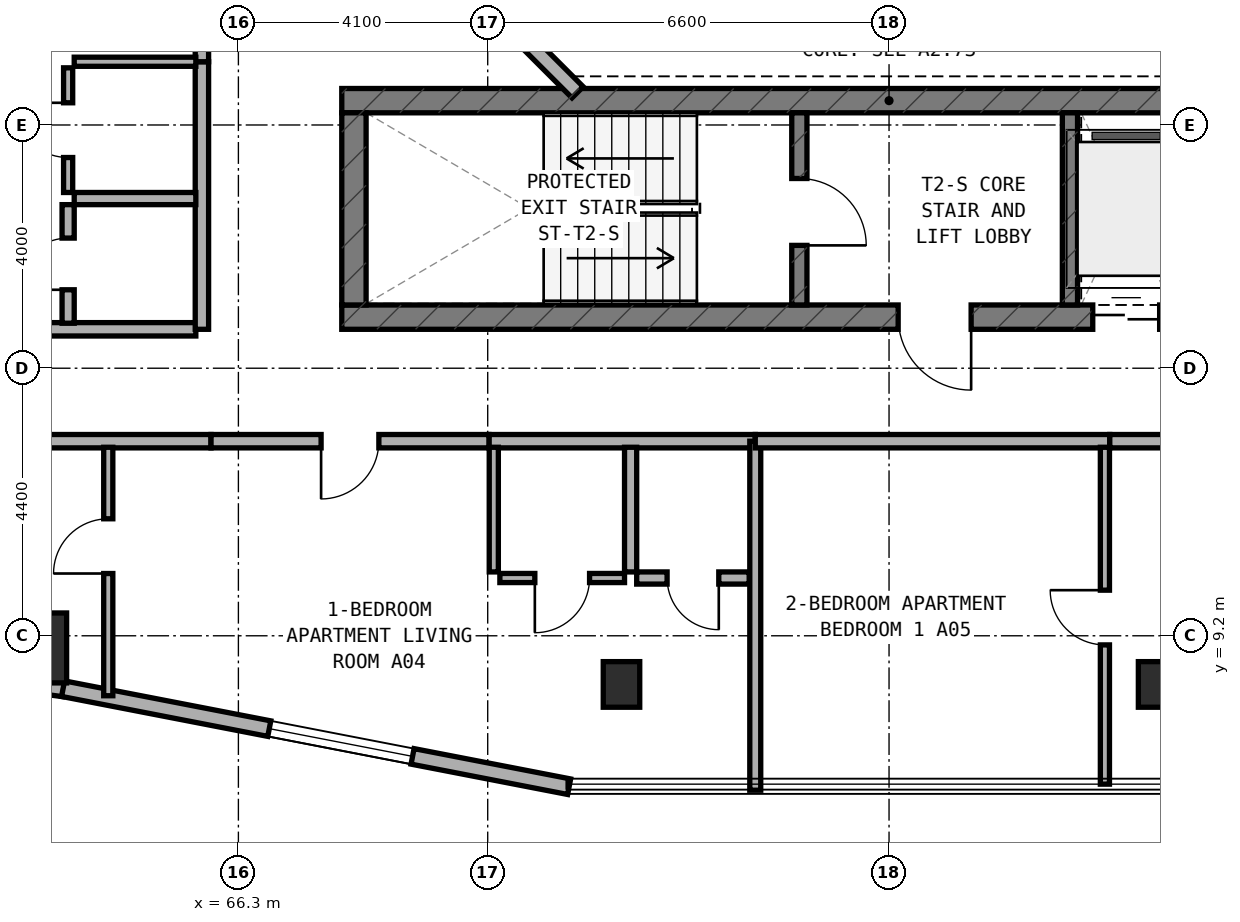
"""IFC4 building model, lengths in metres.
Left out: names, types, materials, properties, quantities, classifications, styles, units other than length and angle.
Written with IfcOpenShell. Run it as: python <this file> out.ifc"""

import sys

from ifc_helpers import new_model, si_unit, direction, frame, frame_2d, origin, origin_2d, place, context, subcontext, project, spatial, rectangle, extrude, element, fill, save


model = new_model("IFC4")
c1 = context("Model", 3, precision=1e-05, world=origin(), true_north=direction((0.0, 1.0)))
c2 = subcontext(c1, "Body", "Model", "MODEL_VIEW")
j1 = project(units=[si_unit("LENGTHUNIT", "METRE"), si_unit("PLANEANGLEUNIT", "RADIAN")], contexts=[c1])
p1 = place(None, origin())
s1 = spatial("IfcSite", under=j1, at=p1, CompositionType="ELEMENT")
p2 = place(p1, origin())
s2 = spatial("IfcBuilding", under=s1, at=p2, CompositionType="ELEMENT")
p3 = place(p2, frame((0.0, 0.0, 98.5)))
s3 = spatial("IfcBuildingStorey", under=s2, at=p3, CompositionType="ELEMENT", Elevation=98.5)
p4 = place(p3, frame((68.0, 14.44, 0.0), z_axis=(0.0, 0.0, 1.0), x_axis=(1.0, 0.0, 0.0)))
e1 = element("IfcWall", 1, at=p4, inside=s3, PredefinedType="SHEAR", context=c2, shape_type="SweptSolid", body=[
    extrude(rectangle(XDim=18.2, YDim=0.4, at=frame_2d((9.1, 0.0))), origin(), (0.0, 0.0, 1.0), 3.5),
])
p5 = place(p4, frame((9.15, 0.0, 0.0)))
e2 = element("IfcOpeningElement", 2, at=p5, cuts=e1, PredefinedType="OPENING", context=c2, shape_type="SweptSolid", body=[
    extrude(rectangle(XDim=1.2, YDim=2.15, at=frame_2d((0.6, 1.075))), frame((0.0, 0.21, 0.0), z_axis=(0.0, -1.0, 0.0), x_axis=(1.0, 0.0, 0.0)), (0.0, 0.0, 1.0), 0.42),
])
p6 = place(p4, frame((16.75, 0.0, 0.0)))
e3 = element("IfcOpeningElement", 3, at=p6, cuts=e1, PredefinedType="OPENING", context=c2, shape_type="SweptSolid", body=[
    extrude(rectangle(XDim=0.85, YDim=2.1, at=frame_2d((0.425, 1.05))), frame((0.0, 0.21, 0.0), z_axis=(0.0, -1.0, 0.0), x_axis=(1.0, 0.0, 0.0)), (0.0, 0.0, 1.0), 0.42),
])
p7 = place(p4, frame((12.35, 0.0, 0.0)))
e4 = element("IfcOpeningElement", 4, at=p7, cuts=e1, PredefinedType="OPENING", context=c2, shape_type="SweptSolid", body=[
    extrude(rectangle(XDim=1.1, YDim=2.15, at=frame_2d((0.55, 1.075))), frame((0.0, 0.21, 0.0), z_axis=(0.0, -1.0, 0.0), x_axis=(1.0, 0.0, 0.0)), (0.0, 0.0, 1.0), 0.42),
])
p8 = place(p4, frame((13.95, 0.0, 0.0)))
e5 = element("IfcOpeningElement", 5, at=p8, cuts=e1, PredefinedType="OPENING", context=c2, shape_type="SweptSolid", body=[
    extrude(rectangle(XDim=1.1, YDim=2.15, at=frame_2d((0.55, 1.075))), frame((0.0, 0.21, 0.0), z_axis=(0.0, -1.0, 0.0), x_axis=(1.0, 0.0, 0.0)), (0.0, 0.0, 1.0), 0.42),
])
p9 = place(p3, frame((68.0, 18.0, 0.0), z_axis=(0.0, 0.0, 1.0), x_axis=(1.0, 0.0, 0.0)))
e6 = element("IfcWall", 6, at=p9, inside=s3, PredefinedType="SHEAR", context=c2, shape_type="SweptSolid", body=[
    extrude(rectangle(XDim=18.2, YDim=0.4, at=frame_2d((9.1, 0.0))), origin(), (0.0, 0.0, 1.0), 3.5),
])
p10 = place(p3, frame((68.2, 14.64, 0.0), z_axis=(0.0, 0.0, 1.0), x_axis=(0.0, 1.0, 0.0)))
e7 = element("IfcWall", 7, at=p10, inside=s3, PredefinedType="SHEAR", context=c2, shape_type="SweptSolid", body=[
    extrude(rectangle(XDim=3.16, YDim=0.4, at=frame_2d((1.58, 0.0))), origin(), (0.0, 0.0, 1.0), 3.5),
])
p11 = place(p3, frame((75.525, 14.64, 0.0), z_axis=(0.0, 0.0, 1.0), x_axis=(0.0, 1.0, 0.0)))
e8 = element("IfcWall", 8, at=p11, inside=s3, PredefinedType="STANDARD", context=c2, shape_type="SweptSolid", body=[
    extrude(rectangle(XDim=3.16, YDim=0.25, at=frame_2d((1.58, 0.0))), origin(), (0.0, 0.0, 1.0), 3.25),
])
p12 = place(p11, frame((0.98, 0.0, 0.0)))
e9 = element("IfcOpeningElement", 9, at=p12, cuts=e8, PredefinedType="OPENING", context=c2, shape_type="SweptSolid", body=[
    extrude(rectangle(XDim=1.1, YDim=2.15, at=frame_2d((0.55, 1.075))), frame((0.0, 0.135, 0.0), z_axis=(0.0, -1.0, 0.0), x_axis=(1.0, 0.0, 0.0)), (0.0, 0.0, 1.0), 0.27),
])
p13 = place(p3, frame((79.975, 14.64, 0.0), z_axis=(0.0, 0.0, 1.0), x_axis=(0.0, 1.0, 0.0)))
e10 = element("IfcWall", 10, at=p13, inside=s3, PredefinedType="STANDARD", context=c2, shape_type="SweptSolid", body=[
    extrude(rectangle(XDim=3.16, YDim=0.25, at=frame_2d((1.58, 0.0))), origin(), (0.0, 0.0, 1.0), 3.25),
])
for number, where, z_axis, x_axis in (
    (11, (72.6, 8.4, 0.0), (0.0, 0.0, 1.0), (1.0, 0.0, 0.0)),
    (12, (81.4, 8.4, 0.0), (0.0, 0.0, 1.0), (1.0, 0.0, 0.0)),
):
    element("IfcColumn", number, at=place(p3, frame(where, z_axis=z_axis, x_axis=x_axis)), inside=s3, PredefinedType="COLUMN", context=c2, shape_type="SweptSolid", body=[
        extrude(rectangle(XDim=0.6, YDim=0.75, at=origin_2d()), origin(), (0.0, 0.0, 1.0), 3.5),
    ])
p14 = place(p3, frame((63.0, 9.0, 0.0), z_axis=(0.0, 0.0, 1.0), x_axis=(1.0, 0.0, 0.0)))
e13 = element("IfcColumn", 13, at=p14, inside=s3, PredefinedType="COLUMN", context=c2, shape_type="SweptSolid", body=[
    extrude(rectangle(XDim=0.95, YDim=1.15, at=origin_2d()), origin(), (0.0, 0.0, 1.0), 3.5),
])
p15 = place(p3, frame((62.719, 8.421, 0.0), z_axis=(0.0, 0.0, 1.0), x_axis=(0.991433279471, -0.130614135366, 0.0)))
e14 = element("IfcWall", 14, at=p15, inside=s3, PredefinedType="STANDARD", context=c2, shape_type="SweptSolid", body=[
    extrude(rectangle(XDim=0.712, YDim=0.26, at=frame_2d((0.356, 0.0))), origin(), (0.0, 0.0, 1.0), 3.25),
])
p16 = place(p3, frame((63.417, 8.33, 0.0), z_axis=(0.0, 0.0, 1.0), x_axis=(0.981750199588, -0.190175039396, 0.0)))
e15 = element("IfcWall", 15, at=p16, inside=s3, PredefinedType="STANDARD", context=c2, shape_type="SweptSolid", body=[
    extrude(rectangle(XDim=8.477, YDim=0.26, at=frame_2d((4.238, 0.0))), origin(), (0.0, 0.0, 1.0), 3.25),
])
p17 = place(p16, frame((3.454, 0.0, 0.8)))
e16 = element("IfcOpeningElement", 16, at=p17, cuts=e15, PredefinedType="OPENING", context=c2, shape_type="SweptSolid", body=[
    extrude(rectangle(XDim=2.4, YDim=1.6, at=frame_2d((1.2, 0.8))), frame((0.0, 0.14, 0.0), z_axis=(0.0, -1.0, 0.0), x_axis=(1.0, 0.0, 0.0)), (0.0, 0.0, 1.0), 0.28),
])
p18 = place(p3, frame((70.244, 19.772, 0.0), z_axis=(0.0, 0.0, 1.0), x_axis=(0.707106781187, -0.707106781187, 0.0)))
e17 = element("IfcWall", 17, at=p18, inside=s3, PredefinedType="STANDARD", context=c2, shape_type="SweptSolid", body=[
    extrude(rectangle(XDim=2.311, YDim=0.26, at=frame_2d((1.155, 0.0))), origin(), (0.0, 0.0, 1.0), 3.25),
])
p19 = place(p3, frame((59.36, 12.4, 0.0), z_axis=(0.0, 0.0, 1.0), x_axis=(1.0, 0.0, 0.0)))
e18 = element("IfcWall", 18, at=p19, inside=s3, PredefinedType="SOLIDWALL", context=c2, shape_type="SweptSolid", body=[
    extrude(rectangle(XDim=6.49, YDim=0.22, at=frame_2d((3.245, 0.0))), origin(), (0.0, 0.0, 1.0), 2.945),
])
p20 = place(p3, frame((70.42, 12.4, 0.0), z_axis=(0.0, 0.0, 1.0), x_axis=(1.0, 0.0, 0.0)))
e19 = element("IfcWall", 19, at=p20, inside=s3, PredefinedType="SOLIDWALL", context=c2, shape_type="SweptSolid", body=[
    extrude(rectangle(XDim=4.38, YDim=0.22, at=frame_2d((2.19, 0.0))), origin(), (0.0, 0.0, 1.0), 2.825),
])
p21 = place(p3, frame((65.85, 12.4, 0.0), z_axis=(0.0, 0.0, 1.0), x_axis=(1.0, 0.0, 0.0)))
e20 = element("IfcWall", 20, at=p21, inside=s3, PredefinedType="SOLIDWALL", context=c2, shape_type="SweptSolid", body=[
    extrude(rectangle(XDim=4.57, YDim=0.22, at=frame_2d((2.285, 0.0))), origin(), (0.0, 0.0, 1.0), 3.22),
])
p22 = place(p21, frame((1.81, 0.0, 0.0)))
e21 = element("IfcOpeningElement", 21, at=p22, cuts=e20, PredefinedType="OPENING", context=c2, shape_type="SweptSolid", body=[
    extrude(rectangle(XDim=0.95, YDim=2.1, at=frame_2d((0.475, 1.05))), frame((0.0, 0.12, 0.0), z_axis=(0.0, -1.0, 0.0), x_axis=(1.0, 0.0, 0.0)), (0.0, 0.0, 1.0), 0.24),
])
p23 = place(p3, frame((64.16, 8.214, 0.0), z_axis=(0.0, 0.0, 1.0), x_axis=(0.0, 1.0, 0.0)))
e22 = element("IfcWall", 22, at=p23, inside=s3, PredefinedType="PARTITIONING", context=c2, shape_type="SweptSolid", body=[
    extrude(rectangle(XDim=4.086, YDim=0.15, at=frame_2d((2.043, 0.0))), origin(), (0.0, 0.0, 1.0), 2.945),
])
p24 = place(p23, frame((2.01, 0.0, 0.0)))
e23 = element("IfcOpeningElement", 23, at=p24, cuts=e22, PredefinedType="OPENING", context=c2, shape_type="SweptSolid", body=[
    extrude(rectangle(XDim=0.9, YDim=2.1, at=frame_2d((0.45, 1.05))), frame((0.0, 0.085, 0.0), z_axis=(0.0, -1.0, 0.0), x_axis=(1.0, 0.0, 0.0)), (0.0, 0.0, 1.0), 0.17),
])
p25 = place(p3, frame((72.75, 10.25, 0.0), z_axis=(0.0, 0.0, 1.0), x_axis=(0.0, 1.0, 0.0)))
e24 = element("IfcWall", 24, at=p25, inside=s3, PredefinedType="PLUMBINGWALL", context=c2, shape_type="SweptSolid", body=[
    extrude(rectangle(XDim=2.05, YDim=0.2, at=frame_2d((1.025, 0.0))), origin(), (0.0, 0.0, 1.0), 2.825),
])
p26 = place(p3, frame((70.5, 10.25, 0.0), z_axis=(0.0, 0.0, 1.0), x_axis=(0.0, 1.0, 0.0)))
e25 = element("IfcWall", 25, at=p26, inside=s3, PredefinedType="PARTITIONING", context=c2, shape_type="SweptSolid", body=[
    extrude(rectangle(XDim=2.05, YDim=0.15, at=frame_2d((1.025, 0.0))), origin(), (0.0, 0.0, 1.0), 3.22),
])
p27 = place(p3, frame((72.85, 10.15, 0.0), z_axis=(0.0, 0.0, 1.0), x_axis=(1.0, 0.0, 0.0)))
e26 = element("IfcWall", 26, at=p27, inside=s3, PredefinedType="PLUMBINGWALL", context=c2, shape_type="SweptSolid", body=[
    extrude(rectangle(XDim=1.85, YDim=0.2, at=frame_2d((0.925, 0.0))), origin(), (0.0, 0.0, 1.0), 3.22),
])
p28 = place(p27, frame((0.5, 0.0, 0.0)))
e27 = element("IfcOpeningElement", 27, at=p28, cuts=e26, PredefinedType="OPENING", context=c2, shape_type="SweptSolid", body=[
    extrude(rectangle(XDim=0.85, YDim=2.1, at=frame_2d((0.425, 1.05))), frame((0.0, 0.11, 0.0), z_axis=(0.0, -1.0, 0.0), x_axis=(1.0, 0.0, 0.0)), (0.0, 0.0, 1.0), 0.22),
])
p29 = place(p3, frame((70.6, 10.15, 0.0), z_axis=(0.0, 0.0, 1.0), x_axis=(1.0, 0.0, 0.0)))
e28 = element("IfcWall", 28, at=p29, inside=s3, PredefinedType="PARTITIONING", context=c2, shape_type="SweptSolid", body=[
    extrude(rectangle(XDim=2.05, YDim=0.15, at=frame_2d((1.025, 0.0))), origin(), (0.0, 0.0, 1.0), 2.825),
])
p30 = place(p29, frame((0.575, 0.0, 0.0)))
e29 = element("IfcOpeningElement", 29, at=p30, cuts=e28, PredefinedType="OPENING", context=c2, shape_type="SweptSolid", body=[
    extrude(rectangle(XDim=0.9, YDim=2.1, at=frame_2d((0.45, 1.05))), frame((0.0, 0.085, 0.0), z_axis=(0.0, -1.0, 0.0), x_axis=(1.0, 0.0, 0.0)), (0.0, 0.0, 1.0), 0.17),
])
p31 = place(p3, frame((74.8, 6.66, 0.0), z_axis=(0.0, 0.0, 1.0), x_axis=(0.0, 1.0, 0.0)))
e30 = element("IfcWall", 30, at=p31, inside=s3, PredefinedType="SOLIDWALL", context=c2, shape_type="SweptSolid", body=[
    extrude(rectangle(XDim=5.74, YDim=0.18, at=frame_2d((2.87, 0.0))), origin(), (0.0, 0.0, 1.0), 2.945),
])
p32 = place(p3, frame((74.8, 12.4, 0.0), z_axis=(0.0, 0.0, 1.0), x_axis=(1.0, 0.0, 0.0)))
e31 = element("IfcWall", 31, at=p32, inside=s3, PredefinedType="SOLIDWALL", context=c2, shape_type="SweptSolid", body=[
    extrude(rectangle(XDim=5.83, YDim=0.22, at=frame_2d((2.915, 0.0))), origin(), (0.0, 0.0, 1.0), 3.22),
])
p33 = place(p3, frame((80.63, 12.4, 0.0), z_axis=(0.0, 0.0, 1.0), x_axis=(1.0, 0.0, 0.0)))
e32 = element("IfcWall", 32, at=p33, inside=s3, PredefinedType="SOLIDWALL", context=c2, shape_type="SweptSolid", body=[
    extrude(rectangle(XDim=3.88, YDim=0.22, at=frame_2d((1.94, 0.0))), origin(), (0.0, 0.0, 1.0), 2.825),
])
p34 = place(p33, frame((1.465, 0.0, 0.0)))
e33 = element("IfcOpeningElement", 33, at=p34, cuts=e32, PredefinedType="OPENING", context=c2, shape_type="SweptSolid", body=[
    extrude(rectangle(XDim=0.95, YDim=2.1, at=frame_2d((0.475, 1.05))), frame((0.0, 0.12, 0.0), z_axis=(0.0, -1.0, 0.0), x_axis=(1.0, 0.0, 0.0)), (0.0, 0.0, 1.0), 0.24),
])
p35 = place(p3, frame((80.55, 6.76, 0.0), z_axis=(0.0, 0.0, 1.0), x_axis=(0.0, 1.0, 0.0)))
e34 = element("IfcWall", 34, at=p35, inside=s3, PredefinedType="PARTITIONING", context=c2, shape_type="SweptSolid", body=[
    extrude(rectangle(XDim=5.54, YDim=0.15, at=frame_2d((2.77, 0.0))), origin(), (0.0, 0.0, 1.0), 2.945),
])
p36 = place(p35, frame((2.29, 0.0, 0.0)))
e35 = element("IfcOpeningElement", 35, at=p36, cuts=e34, PredefinedType="OPENING", context=c2, shape_type="SweptSolid", body=[
    extrude(rectangle(XDim=0.9, YDim=2.1, at=frame_2d((0.45, 1.05))), frame((0.0, 0.085, 0.0), z_axis=(0.0, -1.0, 0.0), x_axis=(1.0, 0.0, 0.0)), (0.0, 0.0, 1.0), 0.17),
])
p37 = place(p3, frame((59.52, 14.24, 0.0), z_axis=(0.0, 0.0, 1.0), x_axis=(1.0, 0.0, 0.0)))
e36 = element("IfcWall", 36, at=p37, inside=s3, PredefinedType="SOLIDWALL", context=c2, shape_type="SweptSolid", body=[
    extrude(rectangle(XDim=6.08, YDim=0.22, at=frame_2d((3.04, 0.0))), origin(), (0.0, 0.0, 1.0), 2.945),
])
p38 = place(p3, frame((65.7, 14.24, 0.0), z_axis=(0.0, 0.0, 1.0), x_axis=(0.0, 1.0, 0.0)))
e37 = element("IfcWall", 37, at=p38, inside=s3, PredefinedType="SOLIDWALL", context=c2, shape_type="SweptSolid", body=[
    extrude(rectangle(XDim=4.4, YDim=0.22, at=frame_2d((2.2, 0.0))), origin(), (0.0, 0.0, 1.0), 3.22),
])
p39 = place(p3, frame((65.7, 18.64, 0.0), z_axis=(0.0, 0.0, 1.0), x_axis=(0.0, 1.0, 0.0)))
e38 = element("IfcWall", 38, at=p39, inside=s3, PredefinedType="SOLIDWALL", context=c2, shape_type="SweptSolid", body=[
    extrude(rectangle(XDim=9.36, YDim=0.22, at=frame_2d((4.68, 0.0))), origin(), (0.0, 0.0, 1.0), 2.825),
])
p40 = place(p39, frame((2.305, 0.0, 0.0)))
e39 = element("IfcOpeningElement", 39, at=p40, cuts=e38, PredefinedType="OPENING", context=c2, shape_type="SweptSolid", body=[
    extrude(rectangle(XDim=0.95, YDim=2.1, at=frame_2d((0.475, 1.05))), frame((0.0, 0.12, 0.0), z_axis=(0.0, -1.0, 0.0), x_axis=(1.0, 0.0, 0.0)), (0.0, 0.0, 1.0), 0.24),
])
p41 = place(p3, frame((63.6, 16.39, 0.0), z_axis=(0.0, 0.0, 1.0), x_axis=(1.0, 0.0, 0.0)))
e40 = element("IfcWall", 40, at=p41, inside=s3, PredefinedType="PLUMBINGWALL", context=c2, shape_type="SweptSolid", body=[
    extrude(rectangle(XDim=2.0, YDim=0.2, at=frame_2d((1.0, 0.0))), origin(), (0.0, 0.0, 1.0), 3.22),
])
p42 = place(p3, frame((63.6, 18.64, 0.0), z_axis=(0.0, 0.0, 1.0), x_axis=(1.0, 0.0, 0.0)))
e41 = element("IfcWall", 41, at=p42, inside=s3, PredefinedType="PARTITIONING", context=c2, shape_type="SweptSolid", body=[
    extrude(rectangle(XDim=2.0, YDim=0.15, at=frame_2d((1.0, 0.0))), origin(), (0.0, 0.0, 1.0), 3.22),
])
p43 = place(p3, frame((63.5, 14.34, 0.0), z_axis=(0.0, 0.0, 1.0), x_axis=(0.0, 1.0, 0.0)))
e42 = element("IfcWall", 42, at=p43, inside=s3, PredefinedType="PLUMBINGWALL", context=c2, shape_type="SweptSolid", body=[
    extrude(rectangle(XDim=1.95, YDim=0.2, at=frame_2d((0.975, 0.0))), origin(), (0.0, 0.0, 1.0), 3.22),
])
p44 = place(p43, frame((0.55, 0.0, 0.0)))
e43 = element("IfcOpeningElement", 43, at=p44, cuts=e42, PredefinedType="OPENING", context=c2, shape_type="SweptSolid", body=[
    extrude(rectangle(XDim=0.85, YDim=2.1, at=frame_2d((0.425, 1.05))), frame((0.0, 0.11, 0.0), z_axis=(0.0, -1.0, 0.0), x_axis=(1.0, 0.0, 0.0)), (0.0, 0.0, 1.0), 0.22),
])
p45 = place(p3, frame((63.5, 16.49, 0.0), z_axis=(0.0, 0.0, 1.0), x_axis=(0.0, 1.0, 0.0)))
e44 = element("IfcWall", 44, at=p45, inside=s3, PredefinedType="PARTITIONING", context=c2, shape_type="SweptSolid", body=[
    extrude(rectangle(XDim=2.05, YDim=0.15, at=frame_2d((1.025, 0.0))), origin(), (0.0, 0.0, 1.0), 3.22),
])
p46 = place(p45, frame((0.575, 0.0, 0.0)))
e45 = element("IfcOpeningElement", 45, at=p46, cuts=e44, PredefinedType="OPENING", context=c2, shape_type="SweptSolid", body=[
    extrude(rectangle(XDim=0.9, YDim=2.1, at=frame_2d((0.45, 1.05))), frame((0.0, 0.085, 0.0), z_axis=(0.0, -1.0, 0.0), x_axis=(1.0, 0.0, 0.0)), (0.0, 0.0, 1.0), 0.17),
])
p47 = place(p17, origin())
e46 = element("IfcWindow", 46, at=p47, inside=s3, PartitioningType="SINGLE_PANEL", PredefinedType="WINDOW", context=c2, shape_type="SweptSolid", body=[
    extrude(rectangle(XDim=2.4, YDim=1.6, at=frame_2d((1.2, 0.8))), frame((0.0, 0.03, 0.0), z_axis=(0.0, -1.0, 0.0), x_axis=(1.0, 0.0, 0.0)), (0.0, 0.0, 1.0), 0.06),
])
fill(e16, e46)
p48 = place(p12, frame((1.1, 0.0, 0.0), z_axis=(0.0, 0.0, 1.0), x_axis=(-1.0, 0.0, 0.0)))
e47 = element("IfcDoor", 47, at=p48, inside=s3, OperationType="SINGLE_SWING_RIGHT", PredefinedType="DOOR", context=c2, shape_type="SweptSolid", body=[
    extrude(rectangle(XDim=1.1, YDim=2.15, at=frame_2d((0.55, 1.075))), frame((0.0, 0.025, 0.0), z_axis=(0.0, -1.0, 0.0), x_axis=(1.0, 0.0, 0.0)), (0.0, 0.0, 1.0), 0.05),
])
fill(e9, e47)
p49 = place(p5, frame((1.2, 0.0, 0.0), z_axis=(0.0, 0.0, 1.0), x_axis=(-1.0, 0.0, 0.0)))
e48 = element("IfcDoor", 48, at=p49, inside=s3, OperationType="SINGLE_SWING_LEFT", PredefinedType="DOOR", context=c2, shape_type="SweptSolid", body=[
    extrude(rectangle(XDim=1.2, YDim=2.15, at=frame_2d((0.6, 1.075))), frame((0.0, 0.025, 0.0), z_axis=(0.0, -1.0, 0.0), x_axis=(1.0, 0.0, 0.0)), (0.0, 0.0, 1.0), 0.05),
])
fill(e2, e48)
p50 = place(p7, frame((1.1, 0.0, 0.0), z_axis=(0.0, 0.0, 1.0), x_axis=(-1.0, 0.0, 0.0)))
e49 = element("IfcDoor", 49, at=p50, inside=s3, OperationType="DOUBLE_DOOR_SLIDING", PredefinedType="DOOR", context=c2, shape_type="SweptSolid", body=[
    extrude(rectangle(XDim=1.1, YDim=2.15, at=frame_2d((0.55, 1.075))), frame((0.0, 0.025, 0.0), z_axis=(0.0, -1.0, 0.0), x_axis=(1.0, 0.0, 0.0)), (0.0, 0.0, 1.0), 0.05),
])
fill(e4, e49)
p51 = place(p22, frame((0.95, 0.0, 0.0), z_axis=(0.0, 0.0, 1.0), x_axis=(-1.0, 0.0, 0.0)))
e50 = element("IfcDoor", 50, at=p51, inside=s3, OperationType="SINGLE_SWING_RIGHT", PredefinedType="DOOR", context=c2, shape_type="SweptSolid", body=[
    extrude(rectangle(XDim=0.95, YDim=2.1, at=frame_2d((0.475, 1.05))), frame((0.0, 0.025, 0.0), z_axis=(0.0, -1.0, 0.0), x_axis=(1.0, 0.0, 0.0)), (0.0, 0.0, 1.0), 0.05),
])
fill(e21, e50)
p52 = place(p24, origin())
e51 = element("IfcDoor", 51, at=p52, inside=s3, OperationType="SINGLE_SWING_LEFT", PredefinedType="DOOR", context=c2, shape_type="SweptSolid", body=[
    extrude(rectangle(XDim=0.9, YDim=2.1, at=frame_2d((0.45, 1.05))), frame((0.0, 0.025, 0.0), z_axis=(0.0, -1.0, 0.0), x_axis=(1.0, 0.0, 0.0)), (0.0, 0.0, 1.0), 0.05),
])
fill(e23, e51)
p53 = place(p28, frame((0.85, 0.0, 0.0), z_axis=(0.0, 0.0, 1.0), x_axis=(-1.0, 0.0, 0.0)))
e52 = element("IfcDoor", 52, at=p53, inside=s3, OperationType="SINGLE_SWING_LEFT", PredefinedType="DOOR", context=c2, shape_type="SweptSolid", body=[
    extrude(rectangle(XDim=0.85, YDim=2.1, at=frame_2d((0.425, 1.05))), frame((0.0, 0.025, 0.0), z_axis=(0.0, -1.0, 0.0), x_axis=(1.0, 0.0, 0.0)), (0.0, 0.0, 1.0), 0.05),
])
fill(e27, e52)
p54 = place(p30, frame((0.9, 0.0, 0.0), z_axis=(0.0, 0.0, 1.0), x_axis=(-1.0, 0.0, 0.0)))
e53 = element("IfcDoor", 53, at=p54, inside=s3, OperationType="SINGLE_SWING_RIGHT", PredefinedType="DOOR", context=c2, shape_type="SweptSolid", body=[
    extrude(rectangle(XDim=0.9, YDim=2.1, at=frame_2d((0.45, 1.05))), frame((0.0, 0.025, 0.0), z_axis=(0.0, -1.0, 0.0), x_axis=(1.0, 0.0, 0.0)), (0.0, 0.0, 1.0), 0.05),
])
fill(e29, e53)
p55 = place(p36, origin())
e54 = element("IfcDoor", 54, at=p55, inside=s3, OperationType="SINGLE_SWING_RIGHT", PredefinedType="DOOR", context=c2, shape_type="SweptSolid", body=[
    extrude(rectangle(XDim=0.9, YDim=2.1, at=frame_2d((0.45, 1.05))), frame((0.0, 0.025, 0.0), z_axis=(0.0, -1.0, 0.0), x_axis=(1.0, 0.0, 0.0)), (0.0, 0.0, 1.0), 0.05),
])
fill(e35, e54)
p56 = place(p44, origin())
e55 = element("IfcDoor", 55, at=p56, inside=s3, OperationType="SINGLE_SWING_LEFT", PredefinedType="DOOR", context=c2, shape_type="SweptSolid", body=[
    extrude(rectangle(XDim=0.85, YDim=2.1, at=frame_2d((0.425, 1.05))), frame((0.0, 0.025, 0.0), z_axis=(0.0, -1.0, 0.0), x_axis=(1.0, 0.0, 0.0)), (0.0, 0.0, 1.0), 0.05),
])
fill(e43, e55)
p57 = place(p46, origin())
e56 = element("IfcDoor", 56, at=p57, inside=s3, OperationType="SINGLE_SWING_RIGHT", PredefinedType="DOOR", context=c2, shape_type="SweptSolid", body=[
    extrude(rectangle(XDim=0.9, YDim=2.1, at=frame_2d((0.45, 1.05))), frame((0.0, 0.025, 0.0), z_axis=(0.0, -1.0, 0.0), x_axis=(1.0, 0.0, 0.0)), (0.0, 0.0, 1.0), 0.05),
])
fill(e45, e56)
save(model, sys.argv[1])
